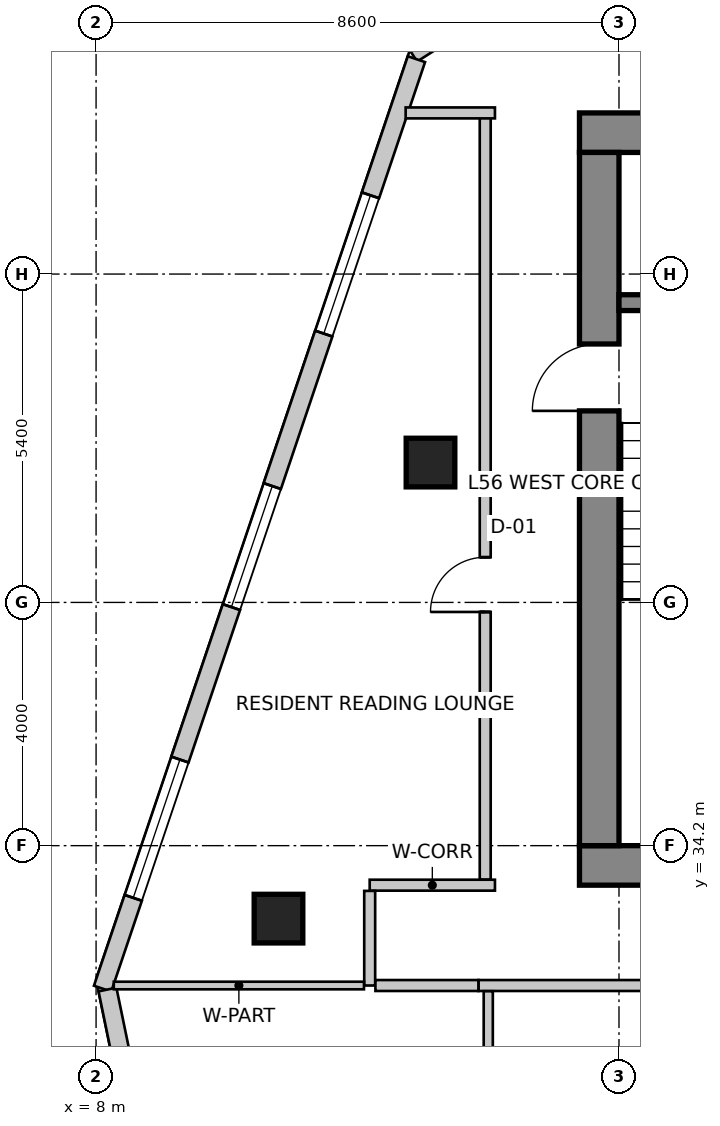
"""IFC4 building model, lengths in metres.
Left out: names, types, materials, properties, quantities, classifications, styles, units other than length and angle.
Written with IfcOpenShell. Run it as: python <this file> out.ifc"""

import sys

from ifc_helpers import new_model, si_unit, direction, frame, frame_2d, origin, origin_2d, place, context, subcontext, project, spatial, rectangle, extrude, source, transform, mapped, element, fill, save


model = new_model("IFC4")
c1 = context("Model", 3, precision=1e-05, world=origin(), true_north=direction((0.0, 1.0)))
c2 = subcontext(c1, "Body", "Model", "MODEL_VIEW")
j1 = project(units=[si_unit("LENGTHUNIT", "METRE"), si_unit("PLANEANGLEUNIT", "RADIAN")], contexts=[c1])
p1 = place(None, origin())
s1 = spatial("IfcSite", under=j1, at=p1, CompositionType="ELEMENT")
p2 = place(p1, origin())
s2 = spatial("IfcBuilding", under=s1, at=p2, CompositionType="ELEMENT")
p3 = place(p2, frame((0.0, 0.0, 221.9)))
s3 = spatial("IfcBuildingStorey", under=s2, at=p3, CompositionType="ELEMENT", Elevation=221.9)
p4 = place(p3, frame((15.95, 45.925, 0.0), z_axis=(0.0, 0.0, 1.0), x_axis=(1.0, 0.0, 0.0)))
e1 = element("IfcWall", 1, at=p4, inside=s3, PredefinedType="SHEAR", context=c2, shape_type="SweptSolid", body=[
    extrude(rectangle(XDim=15.7, YDim=0.65, at=frame_2d((7.85, 0.0))), origin(), (0.0, 0.0, 1.0), 3.5),
])
p5 = place(p3, frame((15.95, 33.875, 0.0), z_axis=(0.0, 0.0, 1.0), x_axis=(1.0, 0.0, 0.0)))
e2 = element("IfcWall", 2, at=p5, inside=s3, PredefinedType="SHEAR", context=c2, shape_type="SweptSolid", body=[
    extrude(rectangle(XDim=15.7, YDim=0.65, at=frame_2d((7.85, 0.0))), origin(), (0.0, 0.0, 1.0), 3.5),
])
m1 = source(origin(), c2, "Body", "SweptSolid", [
    extrude(rectangle(XDim=1.1, YDim=2.15, at=frame_2d((0.55, 1.075))), frame((0.0, 0.335, 0.0), z_axis=(0.0, -1.0, 0.0), x_axis=(1.0, 0.0, 0.0)), (0.0, 0.0, 1.0), 0.67),
])
p6 = place(p5, frame((10.08, 0.0, 0.0)))
e3 = element("IfcOpeningElement", 3, at=p6, cuts=e2, PredefinedType="OPENING", context=c2, shape_type="MappedRepresentation", body=[
    mapped(m1, transform((0.0, 0.0, 0.0), scale=1.0)),
])
p7 = place(p3, frame((16.275, 34.2, 0.0), z_axis=(0.0, 0.0, 1.0), x_axis=(0.0, 1.0, 0.0)))
e4 = element("IfcWall", 4, at=p7, inside=s3, PredefinedType="SHEAR", context=c2, shape_type="SweptSolid", body=[
    extrude(rectangle(XDim=11.4, YDim=0.65, at=frame_2d((5.7, 0.0))), origin(), (0.0, 0.0, 1.0), 3.5),
])
p8 = place(p7, frame((7.15, 0.0, 0.0)))
e5 = element("IfcOpeningElement", 5, at=p8, cuts=e4, PredefinedType="OPENING", context=c2, shape_type="MappedRepresentation", body=[
    mapped(m1, transform((0.0, 0.0, 0.0), scale=1.0)),
])
p9 = place(p3, frame((16.6, 43.13, 0.0), z_axis=(0.0, 0.0, 1.0), x_axis=(1.0, 0.0, 0.0)))
e6 = element("IfcWall", 6, at=p9, inside=s3, PredefinedType="SHEAR", context=c2, shape_type="SweptSolid", body=[
    extrude(rectangle(XDim=3.5, YDim=0.26, at=frame_2d((1.75, 0.0))), origin(), (0.0, 0.0, 1.0), 3.5),
])
m2 = source(origin(), c2, "Body", "SweptSolid", [
    extrude(rectangle(XDim=0.8, YDim=0.8, at=origin_2d()), origin(), (0.0, 0.0, 1.0), 3.5),
])
for number, where, z_axis, x_axis in (
    (7, (11.0, 33.0, 0.0), (0.0, 0.0, 1.0), (1.0, 0.0, 0.0)),
    (8, (13.5, 40.5, 0.0), (0.0, 0.0, 1.0), (1.0, 0.0, 0.0)),
):
    element("IfcColumn", number, at=place(p3, frame(where, z_axis=z_axis, x_axis=x_axis)), inside=s3, PredefinedType="COLUMN", context=c2, shape_type="MappedRepresentation", body=[
        mapped(m2, transform((0.0, 0.0, 0.0), scale=1.0)),
    ])
p10 = place(p3, frame((21.874, 52.742, 0.0), z_axis=(0.0, 0.0, 1.0), x_axis=(-0.84365659959, -0.536883173482, 0.0)))
e9 = element("IfcWall", 9, at=p10, inside=s3, PredefinedType="SOLIDWALL", context=c2, shape_type="SweptSolid", body=[
    extrude(rectangle(XDim=10.283, YDim=0.3, at=frame_2d((5.142, 0.0))), origin(), (0.0, 0.0, 1.0), 3.25),
])
m3 = source(origin(), c2, "Body", "SweptSolid", [
    extrude(rectangle(XDim=2.1, YDim=2.0, at=frame_2d((1.05, 1.0))), frame((0.0, 0.16, 0.0), z_axis=(0.0, -1.0, 0.0), x_axis=(1.0, 0.0, 0.0)), (0.0, 0.0, 1.0), 0.32),
])
p11 = place(p10, frame((3.457, 0.0, 0.85)))
e10 = element("IfcOpeningElement", 10, at=p11, cuts=e9, PredefinedType="OPENING", context=c2, shape_type="MappedRepresentation", body=[
    mapped(m3, transform((0.0, 0.0, 0.0), scale=1.0)),
])
p12 = place(p3, frame((13.269, 47.134, 0.0), z_axis=(0.0, 0.0, 1.0), x_axis=(-0.319920776449, -0.947444297464, 0.0)))
e11 = element("IfcWall", 11, at=p12, inside=s3, PredefinedType="SOLIDWALL", context=c2, shape_type="SweptSolid", body=[
    extrude(rectangle(XDim=16.133, YDim=0.3, at=frame_2d((8.067, 0.0))), origin(), (0.0, 0.0, 1.0), 3.25),
])
m4 = source(origin(), c2, "Body", "SweptSolid", [
    extrude(rectangle(XDim=2.4, YDim=2.2, at=frame_2d((1.2, 1.1))), frame((0.0, 0.16, 0.0), z_axis=(0.0, -1.0, 0.0), x_axis=(1.0, 0.0, 0.0)), (0.0, 0.0, 1.0), 0.32),
])
p13 = place(p12, frame((2.363, 0.0, 0.85)))
e12 = element("IfcOpeningElement", 12, at=p13, cuts=e11, PredefinedType="OPENING", context=c2, shape_type="MappedRepresentation", body=[
    mapped(m4, transform((0.0, 0.0, 0.0), scale=1.0)),
])
p14 = place(p12, frame((7.41, 0.0, 0.85)))
e13 = element("IfcOpeningElement", 13, at=p14, cuts=e11, PredefinedType="OPENING", context=c2, shape_type="MappedRepresentation", body=[
    mapped(m3, transform((0.0, 0.0, 0.0), scale=1.0)),
])
p15 = place(p12, frame((12.157, 0.0, 0.85)))
e14 = element("IfcOpeningElement", 14, at=p15, cuts=e11, PredefinedType="OPENING", context=c2, shape_type="MappedRepresentation", body=[
    mapped(m4, transform((0.0, 0.0, 0.0), scale=1.0)),
])
p16 = place(p3, frame((8.188, 31.834, 0.0), z_axis=(0.0, 0.0, 1.0), x_axis=(0.202303475707, -0.979322880217, 0.0)))
e15 = element("IfcWall", 15, at=p16, inside=s3, PredefinedType="SOLIDWALL", context=c2, shape_type="SweptSolid", body=[
    extrude(rectangle(XDim=15.766, YDim=0.3, at=frame_2d((7.883, 0.0))), origin(), (0.0, 0.0, 1.0), 3.25),
])
p17 = place(p16, frame((1.407, 0.0, 0.85)))
e16 = element("IfcOpeningElement", 16, at=p17, cuts=e15, PredefinedType="OPENING", context=c2, shape_type="MappedRepresentation", body=[
    mapped(m3, transform((0.0, 0.0, 0.0), scale=1.0)),
])
p18 = place(p16, frame((6.194, 0.0, 0.85)))
e17 = element("IfcOpeningElement", 17, at=p18, cuts=e15, PredefinedType="OPENING", context=c2, shape_type="MappedRepresentation", body=[
    mapped(m3, transform((0.0, 0.0, 0.0), scale=1.0)),
])
p19 = place(p16, frame((11.054, 0.0, 0.85)))
e18 = element("IfcOpeningElement", 18, at=p19, cuts=e15, PredefinedType="OPENING", context=c2, shape_type="MappedRepresentation", body=[
    mapped(m3, transform((0.0, 0.0, 0.0), scale=1.0)),
])
p20 = place(p3, frame((12.5, 33.55, 0.0), z_axis=(0.0, 0.0, 1.0), x_axis=(1.0, 0.0, 0.0)))
e19 = element("IfcWall", 19, at=p20, inside=s3, PredefinedType="PARTITIONING", context=c2, shape_type="SweptSolid", body=[
    extrude(rectangle(XDim=2.06, YDim=0.18, at=frame_2d((1.03, 0.0))), origin(), (0.0, 0.0, 1.0), 3.25),
])
p21 = place(p3, frame((12.5, 31.9, 0.0), z_axis=(0.0, 0.0, 1.0), x_axis=(0.0, 1.0, 0.0)))
e20 = element("IfcWall", 20, at=p21, inside=s3, PredefinedType="PARTITIONING", context=c2, shape_type="SweptSolid", body=[
    extrude(rectangle(XDim=1.556, YDim=0.18, at=frame_2d((0.778, 0.0))), origin(), (0.0, 0.0, 1.0), 2.934),
])
p22 = place(p3, frame((17.36, 31.9, 0.0), z_axis=(0.0, 0.0, 1.0), x_axis=(-1.0, 0.0, 0.0)))
e21 = element("IfcWall", 21, at=p22, inside=s3, PredefinedType="PARTITIONING", context=c2, shape_type="SweptSolid", body=[
    extrude(rectangle(XDim=3.07, YDim=0.18, at=frame_2d((1.535, 0.0))), origin(), (0.0, 0.0, 1.0), 2.934),
])
p23 = place(p3, frame((14.288, 31.9, 0.0), z_axis=(0.0, 0.0, 1.0), x_axis=(-1.0, 0.0, 0.0)))
e22 = element("IfcWall", 22, at=p23, inside=s3, PredefinedType="PARTITIONING", context=c2, shape_type="SweptSolid", body=[
    extrude(rectangle(XDim=1.694, YDim=0.18, at=frame_2d((0.847, 0.0))), origin(), (0.0, 0.0, 1.0), 2.934),
])
p24 = place(p3, frame((14.4, 33.644, 0.0), z_axis=(0.0, 0.0, 1.0), x_axis=(0.0, 1.0, 0.0)))
e23 = element("IfcWall", 23, at=p24, inside=s3, PredefinedType="PARTITIONING", context=c2, shape_type="SweptSolid", body=[
    extrude(rectangle(XDim=12.606, YDim=0.18, at=frame_2d((6.303, 0.0))), origin(), (0.0, 0.0, 1.0), 3.25),
])
m5 = source(origin(), c2, "Body", "SweptSolid", [
    extrude(rectangle(XDim=0.9, YDim=2.15, at=frame_2d((0.45, 1.075))), frame((0.0, 0.1, 0.0), z_axis=(0.0, -1.0, 0.0), x_axis=(1.0, 0.0, 0.0)), (0.0, 0.0, 1.0), 0.2),
])
p25 = place(p24, frame((4.399, 0.0, 0.0)))
e24 = element("IfcOpeningElement", 24, at=p25, cuts=e23, PredefinedType="OPENING", context=c2, shape_type="MappedRepresentation", body=[
    mapped(m5, transform((0.0, 0.0, 0.0), scale=1.0)),
])
p26 = place(p3, frame((14.56, 46.25, 0.0), z_axis=(0.0, 0.0, 1.0), x_axis=(-1.0, 0.0, 0.0)))
e25 = element("IfcWall", 25, at=p26, inside=s3, PredefinedType="PARTITIONING", context=c2, shape_type="SweptSolid", body=[
    extrude(rectangle(XDim=1.469, YDim=0.18, at=frame_2d((0.734, 0.0))), origin(), (0.0, 0.0, 1.0), 3.25),
])
p27 = place(p3, frame((12.406, 31.9, 0.0), z_axis=(0.0, 0.0, 1.0), x_axis=(-1.0, 0.0, 0.0)))
e26 = element("IfcWall", 26, at=p27, inside=s3, PredefinedType="PARTITIONING", context=c2, shape_type="SweptSolid", body=[
    extrude(rectangle(XDim=4.115, YDim=0.125, at=frame_2d((2.057, 0.0))), origin(), (0.0, 0.0, 1.0), 2.542),
])
p28 = place(p3, frame((14.45, 27.221, 0.0), z_axis=(0.0, 0.0, 1.0), x_axis=(0.0, 1.0, 0.0)))
e27 = element("IfcWall", 27, at=p28, inside=s3, PredefinedType="PARTITIONING", context=c2, shape_type="SweptSolid", body=[
    extrude(rectangle(XDim=4.585, YDim=0.15, at=frame_2d((2.292, 0.0))), origin(), (0.0, 0.0, 1.0), 2.766),
])
m6 = source(origin(), c2, "Body", "SweptSolid", [
    extrude(rectangle(XDim=2.4, YDim=2.2, at=frame_2d((1.2, 1.1))), frame((0.0, -0.015, 0.0), z_axis=(0.0, -1.0, 0.0), x_axis=(1.0, 0.0, 0.0)), (0.0, 0.0, 1.0), 0.06),
])
p29 = place(p13, origin())
e28 = element("IfcWindow", 28, at=p29, inside=s3, PartitioningType="SINGLE_PANEL", PredefinedType="WINDOW", context=c2, shape_type="MappedRepresentation", body=[
    mapped(m6, transform((0.0, 0.0, 0.0), scale=1.0)),
])
fill(e12, e28)
m7 = source(origin(), c2, "Body", "SweptSolid", [
    extrude(rectangle(XDim=2.1, YDim=2.0, at=frame_2d((1.05, 1.0))), frame((0.0, -0.015, 0.0), z_axis=(0.0, -1.0, 0.0), x_axis=(1.0, 0.0, 0.0)), (0.0, 0.0, 1.0), 0.06),
])
p30 = place(p14, origin())
e29 = element("IfcWindow", 29, at=p30, inside=s3, PartitioningType="SINGLE_PANEL", PredefinedType="WINDOW", context=c2, shape_type="MappedRepresentation", body=[
    mapped(m7, transform((0.0, 0.0, 0.0), scale=1.0)),
])
fill(e13, e29)
p31 = place(p15, origin())
e30 = element("IfcWindow", 30, at=p31, inside=s3, PartitioningType="SINGLE_PANEL", PredefinedType="WINDOW", context=c2, shape_type="MappedRepresentation", body=[
    mapped(m6, transform((0.0, 0.0, 0.0), scale=1.0)),
])
fill(e14, e30)
m8 = source(origin(), c2, "Body", "SweptSolid", [
    extrude(rectangle(XDim=1.1, YDim=2.15, at=frame_2d((0.55, 1.075))), frame((0.0, 0.025, 0.0), z_axis=(0.0, -1.0, 0.0), x_axis=(1.0, 0.0, 0.0)), (0.0, 0.0, 1.0), 0.05),
])
p32 = place(p8, origin())
e31 = element("IfcDoor", 31, at=p32, inside=s3, OperationType="SINGLE_SWING_LEFT", PredefinedType="DOOR", context=c2, shape_type="MappedRepresentation", body=[
    mapped(m8, transform((0.0, 0.0, 0.0), scale=1.0)),
])
fill(e5, e31)
m9 = source(origin(), c2, "Body", "SweptSolid", [
    extrude(rectangle(XDim=0.9, YDim=2.15, at=frame_2d((0.45, 1.075))), frame((0.0, 0.025, 0.0), z_axis=(0.0, -1.0, 0.0), x_axis=(1.0, 0.0, 0.0)), (0.0, 0.0, 1.0), 0.05),
])
p33 = place(p25, origin())
e32 = element("IfcDoor", 32, at=p33, inside=s3, OperationType="SINGLE_SWING_LEFT", PredefinedType="DOOR", context=c2, shape_type="MappedRepresentation", body=[
    mapped(m9, transform((0.0, 0.0, 0.0), scale=1.0)),
])
fill(e24, e32)
save(model, sys.argv[1])
